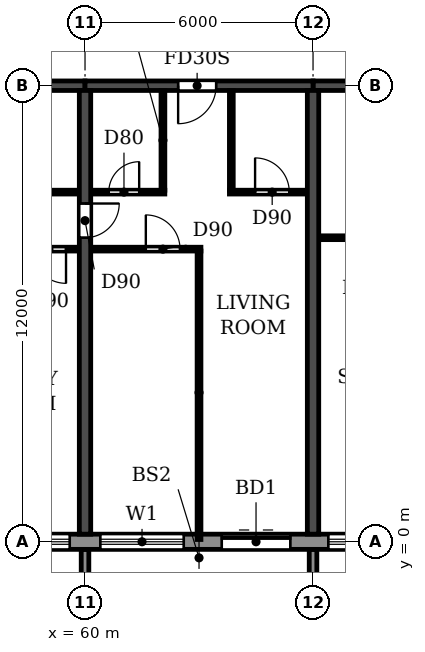
"""IFC4 building model, lengths in metres.
Left out: names, types, materials, properties, quantities, classifications, styles, units other than length and angle.
Written with IfcOpenShell. Run it as: python <this file> out.ifc"""

import sys

from ifc_helpers import new_model, si_unit, direction, frame, frame_2d, origin, place, context, subcontext, project, spatial, polyline, rectangle, outline, extrude, source, transform, mapped, element, fill, save


model = new_model("IFC4")
c1 = context("Model", 3, precision=1e-05, world=origin(), true_north=direction((0.0, 1.0)))
c2 = subcontext(c1, "Body", "Model", "MODEL_VIEW")
j1 = project(units=[si_unit("LENGTHUNIT", "METRE"), si_unit("PLANEANGLEUNIT", "RADIAN")], contexts=[c1])
p1 = place(None, origin())
s1 = spatial("IfcSite", under=j1, at=p1, CompositionType="ELEMENT")
p2 = place(p1, origin())
s2 = spatial("IfcBuilding", under=s1, at=p2, CompositionType="ELEMENT")
p3 = place(p2, frame((0.0, 0.0, 152.1)))
s3 = spatial("IfcBuildingStorey", under=s2, at=p3, CompositionType="ELEMENT", Elevation=152.1)
p4 = place(p3, frame((60.0, 0.2, 0.0), z_axis=(0.0, 0.0, 1.0), x_axis=(0.0, 1.0, 0.0)))
e1 = element("IfcWall", 1, at=p4, inside=s3, PredefinedType="SHEAR", context=c2, shape_type="SweptSolid", body=[
    extrude(rectangle(XDim=11.675, YDim=0.3, at=frame_2d((5.837, 0.0))), origin(), (0.0, 0.0, 1.0), 3.07),
])
p5 = place(p4, frame((7.8, 0.0, 0.0)))
e2 = element("IfcOpeningElement", 2, at=p5, cuts=e1, PredefinedType="OPENING", context=c2, shape_type="SweptSolid", body=[
    extrude(rectangle(XDim=0.9, YDim=2.1, at=frame_2d((0.45, 1.05))), frame((0.0, 0.16, 0.0), z_axis=(0.0, -1.0, 0.0), x_axis=(1.0, 0.0, 0.0)), (0.0, 0.0, 1.0), 0.32),
])
p6 = place(p3, frame((66.0, 0.2, 0.0), z_axis=(0.0, 0.0, 1.0), x_axis=(0.0, 1.0, 0.0)))
e3 = element("IfcWall", 3, at=p6, inside=s3, PredefinedType="SHEAR", context=c2, shape_type="SweptSolid", body=[
    extrude(rectangle(XDim=11.675, YDim=0.3, at=frame_2d((5.837, 0.0))), origin(), (0.0, 0.0, 1.0), 3.07),
])
p7 = place(p3, frame((54.0, 12.0, 0.0), z_axis=(0.0, 0.0, 1.0), x_axis=(1.0, 0.0, 0.0)))
e4 = element("IfcWall", 4, at=p7, inside=s3, PredefinedType="SHEAR", context=c2, shape_type="SweptSolid", body=[
    extrude(rectangle(XDim=6.0, YDim=0.25, at=frame_2d((3.0, 0.0))), origin(), (0.0, 0.0, 1.0), 2.47),
])
p8 = place(p3, frame((60.0, 12.0, 0.0), z_axis=(0.0, 0.0, 1.0), x_axis=(1.0, 0.0, 0.0)))
e5 = element("IfcWall", 5, at=p8, inside=s3, PredefinedType="SHEAR", context=c2, shape_type="SweptSolid", body=[
    extrude(rectangle(XDim=6.0, YDim=0.25, at=frame_2d((3.0, 0.0))), origin(), (0.0, 0.0, 1.0), 2.47),
])
p9 = place(p8, frame((2.45, 0.0, 0.0)))
e6 = element("IfcOpeningElement", 6, at=p9, cuts=e5, PredefinedType="OPENING", context=c2, shape_type="SweptSolid", body=[
    extrude(rectangle(XDim=1.0, YDim=2.1, at=frame_2d((0.5, 1.05))), frame((0.0, 0.135, 0.0), z_axis=(0.0, -1.0, 0.0), x_axis=(1.0, 0.0, 0.0)), (0.0, 0.0, 1.0), 0.27),
])
p10 = place(p3, frame((66.0, 12.0, 0.0), z_axis=(0.0, 0.0, 1.0), x_axis=(1.0, 0.0, 0.0)))
e7 = element("IfcWall", 7, at=p10, inside=s3, PredefinedType="SHEAR", context=c2, shape_type="SweptSolid", body=[
    extrude(rectangle(XDim=6.0, YDim=0.25, at=frame_2d((3.0, 0.0))), origin(), (0.0, 0.0, 1.0), 2.47),
])
p11 = place(p10, frame((2.45, 0.0, 0.0)))
e8 = element("IfcOpeningElement", 8, at=p11, cuts=e7, PredefinedType="OPENING", context=c2, shape_type="SweptSolid", body=[
    extrude(rectangle(XDim=1.0, YDim=2.1, at=frame_2d((0.5, 1.05))), frame((0.0, 0.135, 0.0), z_axis=(0.0, -1.0, 0.0), x_axis=(1.0, 0.0, 0.0)), (0.0, 0.0, 1.0), 0.27),
])
p12 = place(p3, frame((16.683, 0.0, 0.0), z_axis=(0.0, 0.0, 1.0), x_axis=(1.0, 0.0, 0.0)))
e9 = element("IfcWall", 9, at=p12, inside=s3, PredefinedType="STANDARD", context=c2, shape_type="SweptSolid", body=[
    extrude(rectangle(XDim=68.634, YDim=0.4, at=frame_2d((34.317, 0.0))), origin(), (0.0, 0.0, 1.0), 3.07),
])
p13 = place(p12, frame((1.717, 0.0, 0.9)))
e10 = element("IfcOpeningElement", 10, at=p13, cuts=e9, PredefinedType="OPENING", context=c2, shape_type="SweptSolid", body=[
    extrude(rectangle(XDim=2.2, YDim=1.5, at=frame_2d((1.1, 0.75))), frame((0.0, 0.21, 0.0), z_axis=(0.0, -1.0, 0.0), x_axis=(1.0, 0.0, 0.0)), (0.0, 0.0, 1.0), 0.42),
])
p14 = place(p12, frame((4.717, 0.0, 0.9)))
e11 = element("IfcOpeningElement", 11, at=p14, cuts=e9, PredefinedType="OPENING", context=c2, shape_type="SweptSolid", body=[
    extrude(rectangle(XDim=2.2, YDim=1.5, at=frame_2d((1.1, 0.75))), frame((0.0, 0.21, 0.0), z_axis=(0.0, -1.0, 0.0), x_axis=(1.0, 0.0, 0.0)), (0.0, 0.0, 1.0), 0.42),
])
p15 = place(p12, frame((7.917, 0.0, 0.0)))
e12 = element("IfcOpeningElement", 12, at=p15, cuts=e9, PredefinedType="OPENING", context=c2, shape_type="SweptSolid", body=[
    extrude(rectangle(XDim=1.8, YDim=2.4, at=frame_2d((0.9, 1.2))), frame((0.0, 0.21, 0.0), z_axis=(0.0, -1.0, 0.0), x_axis=(1.0, 0.0, 0.0)), (0.0, 0.0, 1.0), 0.42),
])
p16 = place(p12, frame((10.717, 0.0, 0.9)))
e13 = element("IfcOpeningElement", 13, at=p16, cuts=e9, PredefinedType="OPENING", context=c2, shape_type="SweptSolid", body=[
    extrude(rectangle(XDim=2.2, YDim=1.5, at=frame_2d((1.1, 0.75))), frame((0.0, 0.21, 0.0), z_axis=(0.0, -1.0, 0.0), x_axis=(1.0, 0.0, 0.0)), (0.0, 0.0, 1.0), 0.42),
])
p17 = place(p12, frame((13.717, 0.0, 0.9)))
e14 = element("IfcOpeningElement", 14, at=p17, cuts=e9, PredefinedType="OPENING", context=c2, shape_type="SweptSolid", body=[
    extrude(rectangle(XDim=2.2, YDim=1.5, at=frame_2d((1.1, 0.75))), frame((0.0, 0.21, 0.0), z_axis=(0.0, -1.0, 0.0), x_axis=(1.0, 0.0, 0.0)), (0.0, 0.0, 1.0), 0.42),
])
p18 = place(p12, frame((16.717, 0.0, 0.9)))
e15 = element("IfcOpeningElement", 15, at=p18, cuts=e9, PredefinedType="OPENING", context=c2, shape_type="SweptSolid", body=[
    extrude(rectangle(XDim=2.2, YDim=1.5, at=frame_2d((1.1, 0.75))), frame((0.0, 0.21, 0.0), z_axis=(0.0, -1.0, 0.0), x_axis=(1.0, 0.0, 0.0)), (0.0, 0.0, 1.0), 0.42),
])
p19 = place(p12, frame((19.717, 0.0, 0.9)))
e16 = element("IfcOpeningElement", 16, at=p19, cuts=e9, PredefinedType="OPENING", context=c2, shape_type="SweptSolid", body=[
    extrude(rectangle(XDim=2.2, YDim=1.5, at=frame_2d((1.1, 0.75))), frame((0.0, 0.21, 0.0), z_axis=(0.0, -1.0, 0.0), x_axis=(1.0, 0.0, 0.0)), (0.0, 0.0, 1.0), 0.42),
])
p20 = place(p12, frame((22.917, 0.0, 0.0)))
e17 = element("IfcOpeningElement", 17, at=p20, cuts=e9, PredefinedType="OPENING", context=c2, shape_type="SweptSolid", body=[
    extrude(rectangle(XDim=1.8, YDim=2.4, at=frame_2d((0.9, 1.2))), frame((0.0, 0.21, 0.0), z_axis=(0.0, -1.0, 0.0), x_axis=(1.0, 0.0, 0.0)), (0.0, 0.0, 1.0), 0.42),
])
p21 = place(p12, frame((25.717, 0.0, 0.9)))
e18 = element("IfcOpeningElement", 18, at=p21, cuts=e9, PredefinedType="OPENING", context=c2, shape_type="SweptSolid", body=[
    extrude(rectangle(XDim=2.2, YDim=1.5, at=frame_2d((1.1, 0.75))), frame((0.0, 0.21, 0.0), z_axis=(0.0, -1.0, 0.0), x_axis=(1.0, 0.0, 0.0)), (0.0, 0.0, 1.0), 0.42),
])
p22 = place(p12, frame((28.717, 0.0, 0.9)))
e19 = element("IfcOpeningElement", 19, at=p22, cuts=e9, PredefinedType="OPENING", context=c2, shape_type="SweptSolid", body=[
    extrude(rectangle(XDim=2.2, YDim=1.5, at=frame_2d((1.1, 0.75))), frame((0.0, 0.21, 0.0), z_axis=(0.0, -1.0, 0.0), x_axis=(1.0, 0.0, 0.0)), (0.0, 0.0, 1.0), 0.42),
])
p23 = place(p12, frame((31.917, 0.0, 0.0)))
e20 = element("IfcOpeningElement", 20, at=p23, cuts=e9, PredefinedType="OPENING", context=c2, shape_type="SweptSolid", body=[
    extrude(rectangle(XDim=1.8, YDim=2.4, at=frame_2d((0.9, 1.2))), frame((0.0, 0.21, 0.0), z_axis=(0.0, -1.0, 0.0), x_axis=(1.0, 0.0, 0.0)), (0.0, 0.0, 1.0), 0.42),
])
p24 = place(p12, frame((34.717, 0.0, 0.9)))
e21 = element("IfcOpeningElement", 21, at=p24, cuts=e9, PredefinedType="OPENING", context=c2, shape_type="SweptSolid", body=[
    extrude(rectangle(XDim=2.2, YDim=1.5, at=frame_2d((1.1, 0.75))), frame((0.0, 0.21, 0.0), z_axis=(0.0, -1.0, 0.0), x_axis=(1.0, 0.0, 0.0)), (0.0, 0.0, 1.0), 0.42),
])
p25 = place(p12, frame((37.717, 0.0, 0.9)))
e22 = element("IfcOpeningElement", 22, at=p25, cuts=e9, PredefinedType="OPENING", context=c2, shape_type="SweptSolid", body=[
    extrude(rectangle(XDim=2.2, YDim=1.5, at=frame_2d((1.1, 0.75))), frame((0.0, 0.21, 0.0), z_axis=(0.0, -1.0, 0.0), x_axis=(1.0, 0.0, 0.0)), (0.0, 0.0, 1.0), 0.42),
])
p26 = place(p12, frame((40.717, 0.0, 0.9)))
e23 = element("IfcOpeningElement", 23, at=p26, cuts=e9, PredefinedType="OPENING", context=c2, shape_type="SweptSolid", body=[
    extrude(rectangle(XDim=2.2, YDim=1.5, at=frame_2d((1.1, 0.75))), frame((0.0, 0.21, 0.0), z_axis=(0.0, -1.0, 0.0), x_axis=(1.0, 0.0, 0.0)), (0.0, 0.0, 1.0), 0.42),
])
p27 = place(p12, frame((43.717, 0.0, 0.9)))
e24 = element("IfcOpeningElement", 24, at=p27, cuts=e9, PredefinedType="OPENING", context=c2, shape_type="SweptSolid", body=[
    extrude(rectangle(XDim=2.2, YDim=1.5, at=frame_2d((1.1, 0.75))), frame((0.0, 0.21, 0.0), z_axis=(0.0, -1.0, 0.0), x_axis=(1.0, 0.0, 0.0)), (0.0, 0.0, 1.0), 0.42),
])
p28 = place(p12, frame((46.917, 0.0, 0.0)))
e25 = element("IfcOpeningElement", 25, at=p28, cuts=e9, PredefinedType="OPENING", context=c2, shape_type="SweptSolid", body=[
    extrude(rectangle(XDim=1.8, YDim=2.4, at=frame_2d((0.9, 1.2))), frame((0.0, 0.21, 0.0), z_axis=(0.0, -1.0, 0.0), x_axis=(1.0, 0.0, 0.0)), (0.0, 0.0, 1.0), 0.42),
])
p29 = place(p12, frame((49.717, 0.0, 0.9)))
e26 = element("IfcOpeningElement", 26, at=p29, cuts=e9, PredefinedType="OPENING", context=c2, shape_type="SweptSolid", body=[
    extrude(rectangle(XDim=2.2, YDim=1.5, at=frame_2d((1.1, 0.75))), frame((0.0, 0.21, 0.0), z_axis=(0.0, -1.0, 0.0), x_axis=(1.0, 0.0, 0.0)), (0.0, 0.0, 1.0), 0.42),
])
p30 = place(p12, frame((52.717, 0.0, 0.9)))
e27 = element("IfcOpeningElement", 27, at=p30, cuts=e9, PredefinedType="OPENING", context=c2, shape_type="SweptSolid", body=[
    extrude(rectangle(XDim=2.2, YDim=1.5, at=frame_2d((1.1, 0.75))), frame((0.0, 0.21, 0.0), z_axis=(0.0, -1.0, 0.0), x_axis=(1.0, 0.0, 0.0)), (0.0, 0.0, 1.0), 0.42),
])
p31 = place(p12, frame((55.717, 0.0, 0.9)))
e28 = element("IfcOpeningElement", 28, at=p31, cuts=e9, PredefinedType="OPENING", context=c2, shape_type="SweptSolid", body=[
    extrude(rectangle(XDim=2.2, YDim=1.5, at=frame_2d((1.1, 0.75))), frame((0.0, 0.21, 0.0), z_axis=(0.0, -1.0, 0.0), x_axis=(1.0, 0.0, 0.0)), (0.0, 0.0, 1.0), 0.42),
])
p32 = place(p12, frame((58.917, 0.0, 0.0)))
e29 = element("IfcOpeningElement", 29, at=p32, cuts=e9, PredefinedType="OPENING", context=c2, shape_type="SweptSolid", body=[
    extrude(rectangle(XDim=1.8, YDim=2.4, at=frame_2d((0.9, 1.2))), frame((0.0, 0.21, 0.0), z_axis=(0.0, -1.0, 0.0), x_axis=(1.0, 0.0, 0.0)), (0.0, 0.0, 1.0), 0.42),
])
p33 = place(p12, frame((61.717, 0.0, 0.9)))
e30 = element("IfcOpeningElement", 30, at=p33, cuts=e9, PredefinedType="OPENING", context=c2, shape_type="SweptSolid", body=[
    extrude(rectangle(XDim=2.2, YDim=1.5, at=frame_2d((1.1, 0.75))), frame((0.0, 0.21, 0.0), z_axis=(0.0, -1.0, 0.0), x_axis=(1.0, 0.0, 0.0)), (0.0, 0.0, 1.0), 0.42),
])
p34 = place(p12, frame((64.717, 0.0, 0.9)))
e31 = element("IfcOpeningElement", 31, at=p34, cuts=e9, PredefinedType="OPENING", context=c2, shape_type="SweptSolid", body=[
    extrude(rectangle(XDim=2.2, YDim=1.5, at=frame_2d((1.1, 0.75))), frame((0.0, 0.21, 0.0), z_axis=(0.0, -1.0, 0.0), x_axis=(1.0, 0.0, 0.0)), (0.0, 0.0, 1.0), 0.42),
])
m1 = source(origin(), c2, "Body", "SweptSolid", [
    extrude(outline(polyline([(0.0, 0.0), (0.2, 0.0), (0.2, 1.65), (0.0, 1.65), (0.0, 0.0)])), origin(), (0.0, 0.0, 1.0), 3.1),
])
for number, where in (
    (32, (59.9, -1.85, 0.0)),
    (33, (65.9, -1.85, 0.0)),
):
    element("IfcWall", number, at=place(p3, frame(where)), inside=s3, PredefinedType="STANDARD", context=c2, shape_type="MappedRepresentation", body=[
        mapped(m1, transform((0.0, 0.0, 0.0))),
    ])
p35 = place(p3, frame((56.9, 7.7, 0.0), z_axis=(0.0, 0.0, 1.0), x_axis=(1.0, 0.0, 0.0)))
e34 = element("IfcWall", 34, at=p35, inside=s3, PredefinedType="PARTITIONING", context=c2, shape_type="SweptSolid", body=[
    extrude(rectangle(XDim=2.94, YDim=0.1, at=frame_2d((1.47, 0.0))), origin(), (0.0, 0.0, 1.0), 3.07),
])
p36 = place(p35, frame((1.7, 0.0, 0.0)))
e35 = element("IfcOpeningElement", 35, at=p36, cuts=e34, PredefinedType="OPENING", context=c2, shape_type="SweptSolid", body=[
    extrude(rectangle(XDim=0.9, YDim=2.1, at=frame_2d((0.45, 1.05))), frame((0.0, 0.06, 0.0), z_axis=(0.0, -1.0, 0.0), x_axis=(1.0, 0.0, 0.0)), (0.0, 0.0, 1.0), 0.12),
])
p37 = place(p3, frame((60.16, 7.7, 0.0), z_axis=(0.0, 0.0, 1.0), x_axis=(1.0, 0.0, 0.0)))
e36 = element("IfcWall", 36, at=p37, inside=s3, PredefinedType="PARTITIONING", context=c2, shape_type="SweptSolid", body=[
    extrude(rectangle(XDim=2.89, YDim=0.1, at=frame_2d((1.445, 0.0))), origin(), (0.0, 0.0, 1.0), 3.07),
])
p38 = place(p37, frame((1.44, 0.0, 0.0)))
e37 = element("IfcOpeningElement", 37, at=p38, cuts=e36, PredefinedType="OPENING", context=c2, shape_type="SweptSolid", body=[
    extrude(rectangle(XDim=0.9, YDim=2.1, at=frame_2d((0.45, 1.05))), frame((0.0, 0.06, 0.0), z_axis=(0.0, -1.0, 0.0), x_axis=(1.0, 0.0, 0.0)), (0.0, 0.0, 1.0), 0.12),
])
p39 = place(p3, frame((66.16, 8.0, 0.0), z_axis=(0.0, 0.0, 1.0), x_axis=(1.0, 0.0, 0.0)))
e38 = element("IfcWall", 38, at=p39, inside=s3, PredefinedType="PARTITIONING", context=c2, shape_type="SweptSolid", body=[
    extrude(rectangle(XDim=1.94, YDim=0.1, at=frame_2d((0.97, 0.0))), origin(), (0.0, 0.0, 1.0), 3.07),
])
p40 = place(p3, frame((57.1, 9.2, 0.0), z_axis=(0.0, 0.0, 1.0), x_axis=(1.0, 0.0, 0.0)))
e39 = element("IfcWall", 39, at=p40, inside=s3, PredefinedType="PARTITIONING", context=c2, shape_type="SweptSolid", body=[
    extrude(rectangle(XDim=2.74, YDim=0.1, at=frame_2d((1.37, 0.0))), origin(), (0.0, 0.0, 1.0), 3.07),
])
p41 = place(p40, frame((1.0, 0.0, 0.0)))
e40 = element("IfcOpeningElement", 40, at=p41, cuts=e39, PredefinedType="OPENING", context=c2, shape_type="SweptSolid", body=[
    extrude(rectangle(XDim=0.8, YDim=2.1, at=frame_2d((0.4, 1.05))), frame((0.0, 0.06, 0.0), z_axis=(0.0, -1.0, 0.0), x_axis=(1.0, 0.0, 0.0)), (0.0, 0.0, 1.0), 0.12),
])
p42 = place(p3, frame((60.16, 9.2, 0.0), z_axis=(0.0, 0.0, 1.0), x_axis=(1.0, 0.0, 0.0)))
e41 = element("IfcWall", 41, at=p42, inside=s3, PredefinedType="PARTITIONING", context=c2, shape_type="SweptSolid", body=[
    extrude(rectangle(XDim=1.94, YDim=0.1, at=frame_2d((0.97, 0.0))), origin(), (0.0, 0.0, 1.0), 3.07),
])
p43 = place(p42, frame((0.465, 0.0, 0.0)))
e42 = element("IfcOpeningElement", 42, at=p43, cuts=e41, PredefinedType="OPENING", context=c2, shape_type="SweptSolid", body=[
    extrude(rectangle(XDim=0.8, YDim=2.1, at=frame_2d((0.4, 1.05))), frame((0.0, 0.06, 0.0), z_axis=(0.0, -1.0, 0.0), x_axis=(1.0, 0.0, 0.0)), (0.0, 0.0, 1.0), 0.12),
])
p44 = place(p3, frame((63.8, 9.2, 0.0), z_axis=(0.0, 0.0, 1.0), x_axis=(1.0, 0.0, 0.0)))
e43 = element("IfcWall", 43, at=p44, inside=s3, PredefinedType="PARTITIONING", context=c2, shape_type="SweptSolid", body=[
    extrude(rectangle(XDim=2.04, YDim=0.1, at=frame_2d((1.02, 0.0))), origin(), (0.0, 0.0, 1.0), 3.07),
])
p45 = place(p44, frame((0.675, 0.0, 0.0)))
e44 = element("IfcOpeningElement", 44, at=p45, cuts=e43, PredefinedType="OPENING", context=c2, shape_type="SweptSolid", body=[
    extrude(rectangle(XDim=0.9, YDim=2.1, at=frame_2d((0.45, 1.05))), frame((0.0, 0.06, 0.0), z_axis=(0.0, -1.0, 0.0), x_axis=(1.0, 0.0, 0.0)), (0.0, 0.0, 1.0), 0.12),
])
p46 = place(p3, frame((62.05, 9.25, 0.0), z_axis=(0.0, 0.0, 1.0), x_axis=(0.0, 1.0, 0.0)))
e45 = element("IfcWall", 45, at=p46, inside=s3, PredefinedType="PARTITIONING", context=c2, shape_type="SweptSolid", body=[
    extrude(rectangle(XDim=2.615, YDim=0.1, at=frame_2d((1.308, 0.0))), origin(), (0.0, 0.0, 1.0), 3.07),
])
p47 = place(p3, frame((63.0, 0.06, 0.0), z_axis=(0.0, 0.0, 1.0), x_axis=(0.0, 1.0, 0.0)))
e46 = element("IfcWall", 46, at=p47, inside=s3, PredefinedType="PARTITIONING", context=c2, shape_type="SweptSolid", body=[
    extrude(rectangle(XDim=7.59, YDim=0.1, at=frame_2d((3.795, 0.0))), origin(), (0.0, 0.0, 1.0), 3.07),
])
p48 = place(p3, frame((63.85, 9.25, 0.0), z_axis=(0.0, 0.0, 1.0), x_axis=(0.0, 1.0, 0.0)))
e47 = element("IfcWall", 47, at=p48, inside=s3, PredefinedType="PARTITIONING", context=c2, shape_type="SweptSolid", body=[
    extrude(rectangle(XDim=2.615, YDim=0.1, at=frame_2d((1.308, 0.0))), origin(), (0.0, 0.0, 1.0), 3.07),
])
p49 = place(p26, origin())
e48 = element("IfcWindow", 48, at=p49, inside=s3, PartitioningType="DOUBLE_PANEL_HORIZONTAL", PredefinedType="WINDOW", context=c2, shape_type="SweptSolid", body=[
    extrude(rectangle(XDim=2.2, YDim=1.5, at=frame_2d((1.1, 0.75))), frame((0.0, 0.03, 0.0), z_axis=(0.0, -1.0, 0.0), x_axis=(1.0, 0.0, 0.0)), (0.0, 0.0, 1.0), 0.06),
])
fill(e23, e48)
p50 = place(p27, origin())
e49 = element("IfcWindow", 49, at=p50, inside=s3, PartitioningType="DOUBLE_PANEL_HORIZONTAL", PredefinedType="WINDOW", context=c2, shape_type="SweptSolid", body=[
    extrude(rectangle(XDim=2.2, YDim=1.5, at=frame_2d((1.1, 0.75))), frame((0.0, 0.03, 0.0), z_axis=(0.0, -1.0, 0.0), x_axis=(1.0, 0.0, 0.0)), (0.0, 0.0, 1.0), 0.06),
])
fill(e24, e49)
p51 = place(p28, origin())
e50 = element("IfcDoor", 50, at=p51, inside=s3, OperationType="DOUBLE_DOOR_SLIDING", PredefinedType="DOOR", context=c2, shape_type="SweptSolid", body=[
    extrude(rectangle(XDim=1.8, YDim=2.4, at=frame_2d((0.9, 1.2))), frame((0.0, 0.025, 0.0), z_axis=(0.0, -1.0, 0.0), x_axis=(1.0, 0.0, 0.0)), (0.0, 0.0, 1.0), 0.05),
])
fill(e25, e50)
p52 = place(p29, origin())
e51 = element("IfcWindow", 51, at=p52, inside=s3, PartitioningType="DOUBLE_PANEL_HORIZONTAL", PredefinedType="WINDOW", context=c2, shape_type="SweptSolid", body=[
    extrude(rectangle(XDim=2.2, YDim=1.5, at=frame_2d((1.1, 0.75))), frame((0.0, 0.03, 0.0), z_axis=(0.0, -1.0, 0.0), x_axis=(1.0, 0.0, 0.0)), (0.0, 0.0, 1.0), 0.06),
])
fill(e26, e51)
p53 = place(p36, frame((0.9, 0.0, 0.0), z_axis=(0.0, 0.0, 1.0), x_axis=(-1.0, 0.0, 0.0)))
e52 = element("IfcDoor", 52, at=p53, inside=s3, OperationType="SINGLE_SWING_LEFT", PredefinedType="DOOR", context=c2, shape_type="SweptSolid", body=[
    extrude(rectangle(XDim=0.9, YDim=2.1, at=frame_2d((0.45, 1.05))), frame((0.0, 0.025, 0.0), z_axis=(0.0, -1.0, 0.0), x_axis=(1.0, 0.0, 0.0)), (0.0, 0.0, 1.0), 0.05),
])
fill(e35, e52)
p54 = place(p5, frame((0.9, 0.0, 0.0), z_axis=(0.0, 0.0, 1.0), x_axis=(-1.0, 0.0, 0.0)))
e53 = element("IfcDoor", 53, at=p54, inside=s3, OperationType="SINGLE_SWING_LEFT", PredefinedType="DOOR", context=c2, shape_type="SweptSolid", body=[
    extrude(rectangle(XDim=0.9, YDim=2.1, at=frame_2d((0.45, 1.05))), frame((0.0, 0.025, 0.0), z_axis=(0.0, -1.0, 0.0), x_axis=(1.0, 0.0, 0.0)), (0.0, 0.0, 1.0), 0.05),
])
fill(e2, e53)
p55 = place(p43, origin())
e54 = element("IfcDoor", 54, at=p55, inside=s3, OperationType="SINGLE_SWING_RIGHT", PredefinedType="DOOR", context=c2, shape_type="SweptSolid", body=[
    extrude(rectangle(XDim=0.8, YDim=2.1, at=frame_2d((0.4, 1.05))), frame((0.0, 0.025, 0.0), z_axis=(0.0, -1.0, 0.0), x_axis=(1.0, 0.0, 0.0)), (0.0, 0.0, 1.0), 0.05),
])
fill(e42, e54)
p56 = place(p38, origin())
e55 = element("IfcDoor", 55, at=p56, inside=s3, OperationType="SINGLE_SWING_LEFT", PredefinedType="DOOR", context=c2, shape_type="SweptSolid", body=[
    extrude(rectangle(XDim=0.9, YDim=2.1, at=frame_2d((0.45, 1.05))), frame((0.0, 0.025, 0.0), z_axis=(0.0, -1.0, 0.0), x_axis=(1.0, 0.0, 0.0)), (0.0, 0.0, 1.0), 0.05),
])
fill(e37, e55)
p57 = place(p9, frame((1.0, 0.0, 0.0), z_axis=(0.0, 0.0, 1.0), x_axis=(-1.0, 0.0, 0.0)))
e56 = element("IfcDoor", 56, at=p57, inside=s3, OperationType="SINGLE_SWING_RIGHT", PredefinedType="DOOR", context=c2, shape_type="SweptSolid", body=[
    extrude(rectangle(XDim=1.0, YDim=2.1, at=frame_2d((0.5, 1.05))), frame((0.0, 0.025, 0.0), z_axis=(0.0, -1.0, 0.0), x_axis=(1.0, 0.0, 0.0)), (0.0, 0.0, 1.0), 0.05),
])
fill(e6, e56)
p58 = place(p45, origin())
e57 = element("IfcDoor", 57, at=p58, inside=s3, OperationType="SINGLE_SWING_LEFT", PredefinedType="DOOR", context=c2, shape_type="SweptSolid", body=[
    extrude(rectangle(XDim=0.9, YDim=2.1, at=frame_2d((0.45, 1.05))), frame((0.0, 0.025, 0.0), z_axis=(0.0, -1.0, 0.0), x_axis=(1.0, 0.0, 0.0)), (0.0, 0.0, 1.0), 0.05),
])
fill(e44, e57)
save(model, sys.argv[1])
